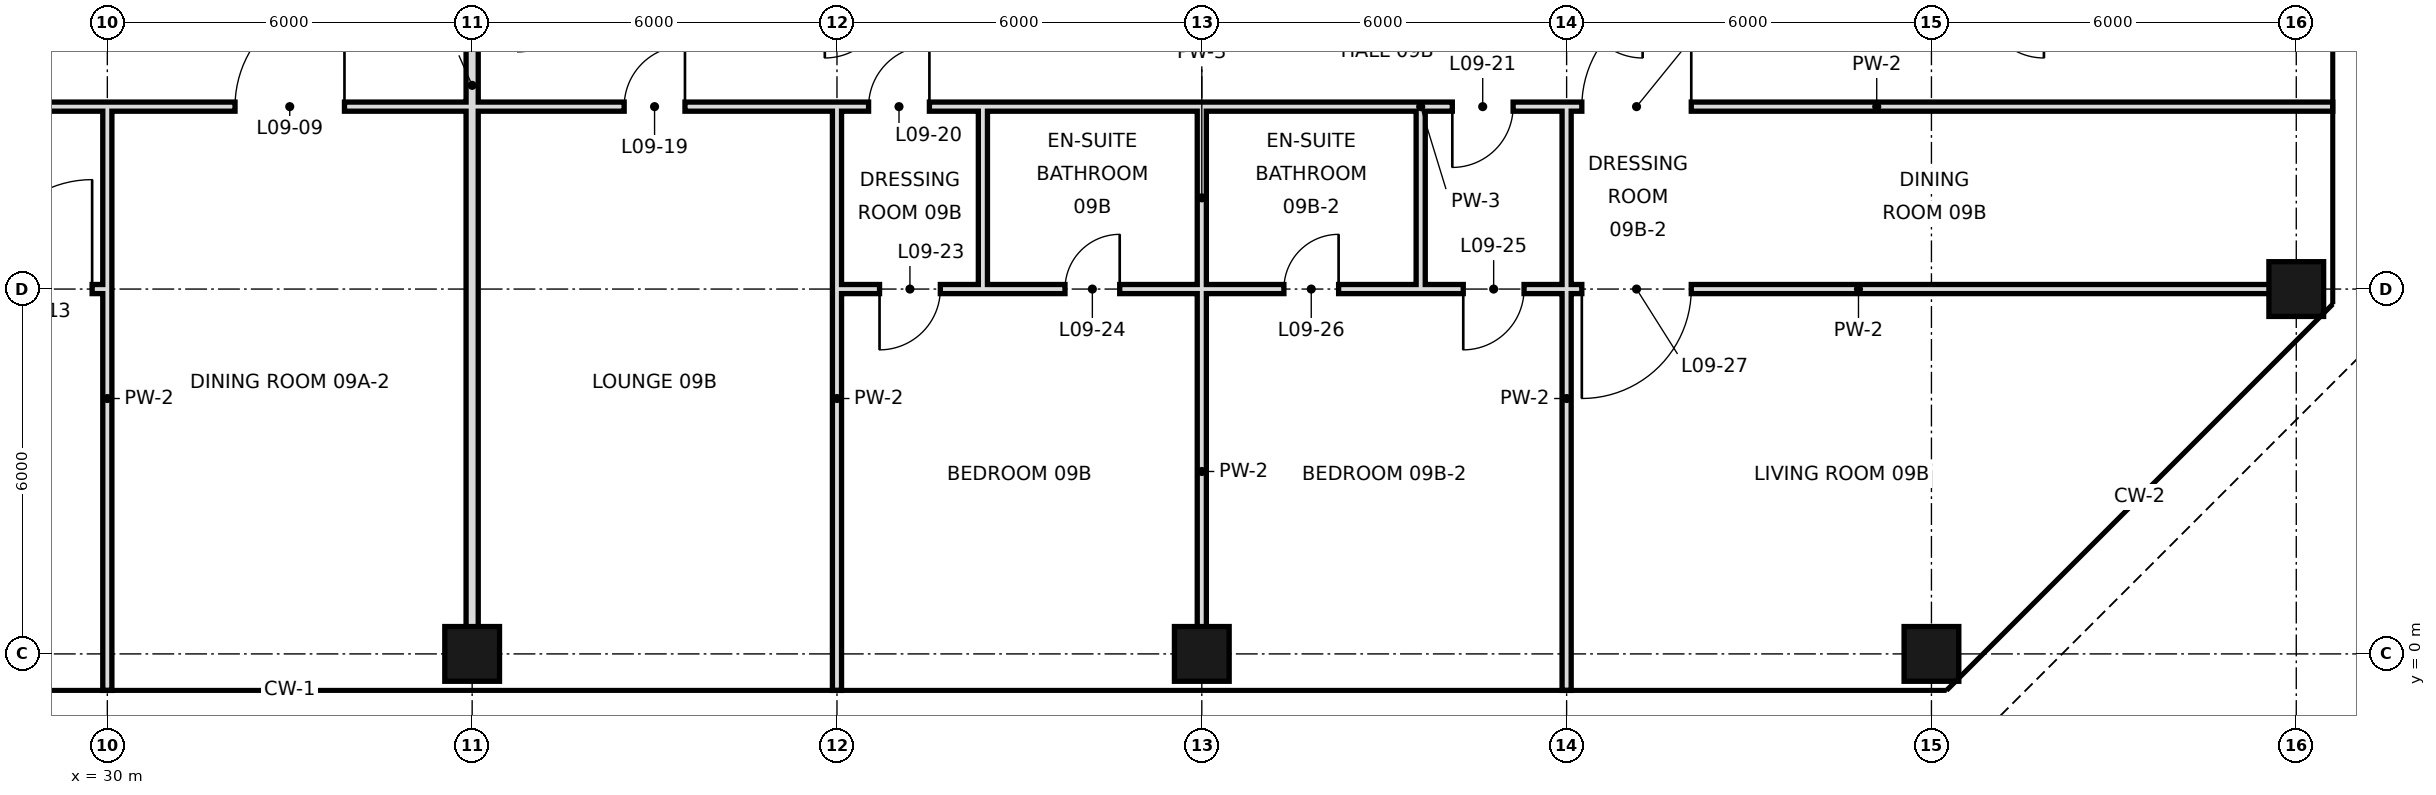
"""IFC4 building model, lengths in metres.
Left out: names, types, materials, properties, quantities, classifications, styles, units other than length and angle.
Written with IfcOpenShell. Run it as: python <this file> out.ifc"""

import sys

from ifc_helpers import new_model, si_unit, direction, frame, frame_2d, origin, origin_2d, place, context, subcontext, project, spatial, rectangle, hollow_rectangle, extrude, element, fill, save


model = new_model("IFC4")
c1 = context("Model", 3, precision=1e-05, world=origin(), true_north=direction((0.0, 1.0)))
c2 = subcontext(c1, "Body", "Model", "MODEL_VIEW")
j1 = project(units=[si_unit("LENGTHUNIT", "METRE"), si_unit("PLANEANGLEUNIT", "RADIAN")], contexts=[c1])
p1 = place(None, origin())
s1 = spatial("IfcSite", under=j1, at=p1, CompositionType="ELEMENT")
p2 = place(p1, origin())
s2 = spatial("IfcBuilding", under=s1, at=p2, CompositionType="ELEMENT")
p3 = place(p2, frame((0.0, 0.0, 53.4)))
s3 = spatial("IfcBuildingStorey", under=s2, at=p3, CompositionType="ELEMENT", Elevation=53.4)
for number, where, z_axis, x_axis in (
    (1, (36.0, 0.0, 0.0), (0.0, 0.0, 1.0), (1.0, 0.0, 0.0)),
    (2, (48.0, 0.0, 0.0), (0.0, 0.0, 1.0), (1.0, 0.0, 0.0)),
    (3, (60.0, 0.0, 0.0), (0.0, 0.0, 1.0), (1.0, 0.0, 0.0)),
    (4, (66.0, 6.0, 0.0), (0.0, 0.0, 1.0), (1.0, 0.0, 0.0)),
):
    element("IfcColumn", number, at=place(p3, frame(where, z_axis=z_axis, x_axis=x_axis)), inside=s3, PredefinedType="COLUMN", context=c2, shape_type="SweptSolid", body=[
        extrude(hollow_rectangle(XDim=0.9, YDim=0.9, WallThickness=0.045, at=origin_2d()), origin(), (0.0, 0.0, 1.0), 3.6),
    ])
p4 = place(p3, frame((30.0, -0.6, 0.0), z_axis=(0.0, 0.0, 1.0), x_axis=(0.0, 1.0, 0.0)))
e5 = element("IfcWall", 5, at=p4, inside=s3, PredefinedType="PARTITIONING", context=c2, shape_type="SweptSolid", body=[
    extrude(rectangle(XDim=9.6, YDim=0.15, at=frame_2d((4.8, 0.0))), origin(), (0.0, 0.0, 1.0), 2.72),
])
p5 = place(p3, frame((36.0, 0.0, 0.0), z_axis=(0.0, 0.0, 1.0), x_axis=(0.0, 1.0, 0.0)))
e6 = element("IfcWall", 6, at=p5, inside=s3, PredefinedType="SOLIDWALL", context=c2, shape_type="SweptSolid", body=[
    extrude(rectangle(XDim=18.7, YDim=0.2, at=frame_2d((9.35, 0.0))), origin(), (0.0, 0.0, 1.0), 2.72),
])
p6 = place(p3, frame((42.0, -0.6, 0.0), z_axis=(0.0, 0.0, 1.0), x_axis=(0.0, 1.0, 0.0)))
e7 = element("IfcWall", 7, at=p6, inside=s3, PredefinedType="PARTITIONING", context=c2, shape_type="SweptSolid", body=[
    extrude(rectangle(XDim=9.6, YDim=0.15, at=frame_2d((4.8, 0.0))), origin(), (0.0, 0.0, 1.0), 2.72),
])
p7 = place(p3, frame((44.4, 6.0, 0.0), z_axis=(0.0, 0.0, 1.0), x_axis=(0.0, 1.0, 0.0)))
e8 = element("IfcWall", 8, at=p7, inside=s3, PredefinedType="PARTITIONING", context=c2, shape_type="SweptSolid", body=[
    extrude(rectangle(XDim=3.0, YDim=0.15, at=frame_2d((1.5, 0.0))), origin(), (0.0, 0.0, 1.0), 3.42),
])
p8 = place(p3, frame((48.0, 0.0, 0.0), z_axis=(0.0, 0.0, 1.0), x_axis=(0.0, 1.0, 0.0)))
e9 = element("IfcWall", 9, at=p8, inside=s3, PredefinedType="PARTITIONING", context=c2, shape_type="SweptSolid", body=[
    extrude(rectangle(XDim=6.0, YDim=0.15, at=frame_2d((3.0, 0.0))), origin(), (0.0, 0.0, 1.0), 2.72),
])
p9 = place(p3, frame((48.0, 6.0, 0.0), z_axis=(0.0, 0.0, 1.0), x_axis=(0.0, 1.0, 0.0)))
e10 = element("IfcWall", 10, at=p9, inside=s3, PredefinedType="PARTITIONING", context=c2, shape_type="SweptSolid", body=[
    extrude(rectangle(XDim=3.0, YDim=0.15, at=frame_2d((1.5, 0.0))), origin(), (0.0, 0.0, 1.0), 2.72),
])
p10 = place(p3, frame((51.6, 6.0, 0.0), z_axis=(0.0, 0.0, 1.0), x_axis=(0.0, 1.0, 0.0)))
e11 = element("IfcWall", 11, at=p10, inside=s3, PredefinedType="PARTITIONING", context=c2, shape_type="SweptSolid", body=[
    extrude(rectangle(XDim=3.0, YDim=0.15, at=frame_2d((1.5, 0.0))), origin(), (0.0, 0.0, 1.0), 3.42),
])
p11 = place(p3, frame((54.0, -0.6, 0.0), z_axis=(0.0, 0.0, 1.0), x_axis=(0.0, 1.0, 0.0)))
e12 = element("IfcWall", 12, at=p11, inside=s3, PredefinedType="PARTITIONING", context=c2, shape_type="SweptSolid", body=[
    extrude(rectangle(XDim=9.6, YDim=0.15, at=frame_2d((4.8, 0.0))), origin(), (0.0, 0.0, 1.0), 3.42),
])
p12 = place(p3, frame((18.0, 6.0, 0.0), z_axis=(0.0, 0.0, 1.0), x_axis=(1.0, 0.0, 0.0)))
e13 = element("IfcWall", 13, at=p12, inside=s3, PredefinedType="PARTITIONING", context=c2, shape_type="SweptSolid", body=[
    extrude(rectangle(XDim=12.0, YDim=0.15, at=frame_2d((6.0, 0.0))), origin(), (0.0, 0.0, 1.0), 2.97),
])
p13 = place(p12, frame((9.95, 0.0, 0.0)))
e14 = element("IfcOpeningElement", 14, at=p13, cuts=e13, PredefinedType="OPENING", context=c2, shape_type="SweptSolid", body=[
    extrude(rectangle(XDim=1.8, YDim=2.4, at=frame_2d((0.9, 1.2))), frame((0.0, 0.085, 0.0), z_axis=(0.0, -1.0, 0.0), x_axis=(1.0, 0.0, 0.0)), (0.0, 0.0, 1.0), 0.17),
])
p14 = place(p3, frame((42.0, 6.0, 0.0), z_axis=(0.0, 0.0, 1.0), x_axis=(1.0, 0.0, 0.0)))
e15 = element("IfcWall", 15, at=p14, inside=s3, PredefinedType="PARTITIONING", context=c2, shape_type="SweptSolid", body=[
    extrude(rectangle(XDim=2.4, YDim=0.15, at=frame_2d((1.2, 0.0))), origin(), (0.0, 0.0, 1.0), 2.97),
])
p15 = place(p14, frame((0.7, 0.0, 0.0)))
e16 = element("IfcOpeningElement", 16, at=p15, cuts=e15, PredefinedType="OPENING", context=c2, shape_type="SweptSolid", body=[
    extrude(rectangle(XDim=1.0, YDim=2.4, at=frame_2d((0.5, 1.2))), frame((0.0, 0.085, 0.0), z_axis=(0.0, -1.0, 0.0), x_axis=(1.0, 0.0, 0.0)), (0.0, 0.0, 1.0), 0.17),
])
p16 = place(p3, frame((51.6, 6.0, 0.0), z_axis=(0.0, 0.0, 1.0), x_axis=(1.0, 0.0, 0.0)))
e17 = element("IfcWall", 17, at=p16, inside=s3, PredefinedType="PARTITIONING", context=c2, shape_type="SweptSolid", body=[
    extrude(rectangle(XDim=14.4, YDim=0.15, at=frame_2d((7.2, 0.0))), origin(), (0.0, 0.0, 1.0), 2.52),
])
p17 = place(p16, frame((0.7, 0.0, 0.0)))
e18 = element("IfcOpeningElement", 18, at=p17, cuts=e17, PredefinedType="OPENING", context=c2, shape_type="SweptSolid", body=[
    extrude(rectangle(XDim=1.0, YDim=2.4, at=frame_2d((0.5, 1.2))), frame((0.0, 0.085, 0.0), z_axis=(0.0, -1.0, 0.0), x_axis=(1.0, 0.0, 0.0)), (0.0, 0.0, 1.0), 0.17),
])
p18 = place(p16, frame((2.65, 0.0, 0.0)))
e19 = element("IfcOpeningElement", 19, at=p18, cuts=e17, PredefinedType="OPENING", context=c2, shape_type="SweptSolid", body=[
    extrude(rectangle(XDim=1.8, YDim=2.4, at=frame_2d((0.9, 1.2))), frame((0.0, 0.085, 0.0), z_axis=(0.0, -1.0, 0.0), x_axis=(1.0, 0.0, 0.0)), (0.0, 0.0, 1.0), 0.17),
])
p19 = place(p3, frame((44.4, 6.0, 0.0), z_axis=(0.0, 0.0, 1.0), x_axis=(1.0, 0.0, 0.0)))
e20 = element("IfcWall", 20, at=p19, inside=s3, PredefinedType="PARTITIONING", context=c2, shape_type="SweptSolid", body=[
    extrude(rectangle(XDim=7.2, YDim=0.15, at=frame_2d((3.6, 0.0))), origin(), (0.0, 0.0, 1.0), 2.52),
])
p20 = place(p19, frame((1.35, 0.0, 0.0)))
e21 = element("IfcOpeningElement", 21, at=p20, cuts=e20, PredefinedType="OPENING", context=c2, shape_type="SweptSolid", body=[
    extrude(rectangle(XDim=0.9, YDim=2.4, at=frame_2d((0.45, 1.2))), frame((0.0, 0.085, 0.0), z_axis=(0.0, -1.0, 0.0), x_axis=(1.0, 0.0, 0.0)), (0.0, 0.0, 1.0), 0.17),
])
p21 = place(p19, frame((4.95, 0.0, 0.0)))
e22 = element("IfcOpeningElement", 22, at=p21, cuts=e20, PredefinedType="OPENING", context=c2, shape_type="SweptSolid", body=[
    extrude(rectangle(XDim=0.9, YDim=2.4, at=frame_2d((0.45, 1.2))), frame((0.0, 0.085, 0.0), z_axis=(0.0, -1.0, 0.0), x_axis=(1.0, 0.0, 0.0)), (0.0, 0.0, 1.0), 0.17),
])
p22 = place(p3, frame((8.4, 9.0, 0.0), z_axis=(0.0, 0.0, 1.0), x_axis=(1.0, 0.0, 0.0)))
e23 = element("IfcWall", 23, at=p22, inside=s3, PredefinedType="PARTITIONING", context=c2, shape_type="SweptSolid", body=[
    extrude(rectangle(XDim=36.0, YDim=0.15, at=frame_2d((18.0, 0.0))), origin(), (0.0, 0.0, 1.0), 3.42),
])
p23 = place(p22, frame((0.88, 0.0, 0.0)))
e24 = element("IfcOpeningElement", 24, at=p23, cuts=e23, PredefinedType="OPENING", context=c2, shape_type="SweptSolid", body=[
    extrude(rectangle(XDim=1.0, YDim=2.4, at=frame_2d((0.5, 1.2))), frame((0.0, 0.085, 0.0), z_axis=(0.0, -1.0, 0.0), x_axis=(1.0, 0.0, 0.0)), (0.0, 0.0, 1.0), 0.17),
])
p24 = place(p22, frame((6.1, 0.0, 0.0)))
e25 = element("IfcOpeningElement", 25, at=p24, cuts=e23, PredefinedType="OPENING", context=c2, shape_type="SweptSolid", body=[
    extrude(rectangle(XDim=1.0, YDim=2.4, at=frame_2d((0.5, 1.2))), frame((0.0, 0.085, 0.0), z_axis=(0.0, -1.0, 0.0), x_axis=(1.0, 0.0, 0.0)), (0.0, 0.0, 1.0), 0.17),
])
p25 = place(p22, frame((16.64, 0.0, 0.0)))
e26 = element("IfcOpeningElement", 26, at=p25, cuts=e23, PredefinedType="OPENING", context=c2, shape_type="SweptSolid", body=[
    extrude(rectangle(XDim=1.8, YDim=2.4, at=frame_2d((0.9, 1.2))), frame((0.0, 0.085, 0.0), z_axis=(0.0, -1.0, 0.0), x_axis=(1.0, 0.0, 0.0)), (0.0, 0.0, 1.0), 0.17),
])
p26 = place(p22, frame((23.7, 0.0, 0.0)))
e27 = element("IfcOpeningElement", 27, at=p26, cuts=e23, PredefinedType="OPENING", context=c2, shape_type="SweptSolid", body=[
    extrude(rectangle(XDim=1.8, YDim=2.4, at=frame_2d((0.9, 1.2))), frame((0.0, 0.085, 0.0), z_axis=(0.0, -1.0, 0.0), x_axis=(1.0, 0.0, 0.0)), (0.0, 0.0, 1.0), 0.17),
])
p27 = place(p22, frame((30.1, 0.0, 0.0)))
e28 = element("IfcOpeningElement", 28, at=p27, cuts=e23, PredefinedType="OPENING", context=c2, shape_type="SweptSolid", body=[
    extrude(rectangle(XDim=1.0, YDim=2.4, at=frame_2d((0.5, 1.2))), frame((0.0, 0.085, 0.0), z_axis=(0.0, -1.0, 0.0), x_axis=(1.0, 0.0, 0.0)), (0.0, 0.0, 1.0), 0.17),
])
p28 = place(p22, frame((34.12, 0.0, 0.0)))
e29 = element("IfcOpeningElement", 29, at=p28, cuts=e23, PredefinedType="OPENING", context=c2, shape_type="SweptSolid", body=[
    extrude(rectangle(XDim=1.0, YDim=2.4, at=frame_2d((0.5, 1.2))), frame((0.0, 0.085, 0.0), z_axis=(0.0, -1.0, 0.0), x_axis=(1.0, 0.0, 0.0)), (0.0, 0.0, 1.0), 0.17),
])
p29 = place(p3, frame((51.6, 9.0, 0.0), z_axis=(0.0, 0.0, 1.0), x_axis=(1.0, 0.0, 0.0)))
e30 = element("IfcWall", 30, at=p29, inside=s3, PredefinedType="PARTITIONING", context=c2, shape_type="SweptSolid", body=[
    extrude(rectangle(XDim=15.0, YDim=0.15, at=frame_2d((7.5, 0.0))), origin(), (0.0, 0.0, 1.0), 3.42),
])
p30 = place(p29, frame((0.52, 0.0, 0.0)))
e31 = element("IfcOpeningElement", 31, at=p30, cuts=e30, PredefinedType="OPENING", context=c2, shape_type="SweptSolid", body=[
    extrude(rectangle(XDim=1.0, YDim=2.4, at=frame_2d((0.5, 1.2))), frame((0.0, 0.085, 0.0), z_axis=(0.0, -1.0, 0.0), x_axis=(1.0, 0.0, 0.0)), (0.0, 0.0, 1.0), 0.17),
])
p31 = place(p29, frame((2.65, 0.0, 0.0)))
e32 = element("IfcOpeningElement", 32, at=p31, cuts=e30, PredefinedType="OPENING", context=c2, shape_type="SweptSolid", body=[
    extrude(rectangle(XDim=1.8, YDim=2.4, at=frame_2d((0.9, 1.2))), frame((0.0, 0.085, 0.0), z_axis=(0.0, -1.0, 0.0), x_axis=(1.0, 0.0, 0.0)), (0.0, 0.0, 1.0), 0.17),
])
p32 = place(p3, frame((44.4, 9.0, 0.0), z_axis=(0.0, 0.0, 1.0), x_axis=(1.0, 0.0, 0.0)))
e33 = element("IfcWall", 33, at=p32, inside=s3, PredefinedType="PARTITIONING", context=c2, shape_type="SweptSolid", body=[
    extrude(rectangle(XDim=7.2, YDim=0.15, at=frame_2d((3.6, 0.0))), origin(), (0.0, 0.0, 1.0), 3.42),
])
p33 = place(p26, frame((1.8, 0.0, 0.0), z_axis=(0.0, 0.0, 1.0), x_axis=(-1.0, 0.0, 0.0)))
e34 = element("IfcDoor", 34, at=p33, inside=s3, OperationType="SINGLE_SWING_LEFT", PredefinedType="DOOR", context=c2, shape_type="SweptSolid", body=[
    extrude(rectangle(XDim=1.8, YDim=2.4, at=frame_2d((0.9, 1.2))), frame((0.0, 0.025, 0.0), z_axis=(0.0, -1.0, 0.0), x_axis=(1.0, 0.0, 0.0)), (0.0, 0.0, 1.0), 0.05),
])
fill(e27, e34)
p34 = place(p13, frame((1.8, 0.0, 0.0), z_axis=(0.0, 0.0, 1.0), x_axis=(-1.0, 0.0, 0.0)))
e35 = element("IfcDoor", 35, at=p34, inside=s3, OperationType="SINGLE_SWING_LEFT", PredefinedType="DOOR", context=c2, shape_type="SweptSolid", body=[
    extrude(rectangle(XDim=1.8, YDim=2.4, at=frame_2d((0.9, 1.2))), frame((0.0, 0.025, 0.0), z_axis=(0.0, -1.0, 0.0), x_axis=(1.0, 0.0, 0.0)), (0.0, 0.0, 1.0), 0.05),
])
fill(e14, e35)
p35 = place(p27, frame((1.0, 0.0, 0.0), z_axis=(0.0, 0.0, 1.0), x_axis=(-1.0, 0.0, 0.0)))
e36 = element("IfcDoor", 36, at=p35, inside=s3, OperationType="SINGLE_SWING_LEFT", PredefinedType="DOOR", context=c2, shape_type="SweptSolid", body=[
    extrude(rectangle(XDim=1.0, YDim=2.4, at=frame_2d((0.5, 1.2))), frame((0.0, 0.025, 0.0), z_axis=(0.0, -1.0, 0.0), x_axis=(1.0, 0.0, 0.0)), (0.0, 0.0, 1.0), 0.05),
])
fill(e28, e36)
p36 = place(p28, frame((1.0, 0.0, 0.0), z_axis=(0.0, 0.0, 1.0), x_axis=(-1.0, 0.0, 0.0)))
e37 = element("IfcDoor", 37, at=p36, inside=s3, OperationType="SINGLE_SWING_LEFT", PredefinedType="DOOR", context=c2, shape_type="SweptSolid", body=[
    extrude(rectangle(XDim=1.0, YDim=2.4, at=frame_2d((0.5, 1.2))), frame((0.0, 0.025, 0.0), z_axis=(0.0, -1.0, 0.0), x_axis=(1.0, 0.0, 0.0)), (0.0, 0.0, 1.0), 0.05),
])
fill(e29, e37)
p37 = place(p30, frame((1.0, 0.0, 0.0), z_axis=(0.0, 0.0, 1.0), x_axis=(-1.0, 0.0, 0.0)))
e38 = element("IfcDoor", 38, at=p37, inside=s3, OperationType="SINGLE_SWING_RIGHT", PredefinedType="DOOR", context=c2, shape_type="SweptSolid", body=[
    extrude(rectangle(XDim=1.0, YDim=2.4, at=frame_2d((0.5, 1.2))), frame((0.0, 0.025, 0.0), z_axis=(0.0, -1.0, 0.0), x_axis=(1.0, 0.0, 0.0)), (0.0, 0.0, 1.0), 0.05),
])
fill(e31, e38)
p38 = place(p31, frame((1.8, 0.0, 0.0), z_axis=(0.0, 0.0, 1.0), x_axis=(-1.0, 0.0, 0.0)))
e39 = element("IfcDoor", 39, at=p38, inside=s3, OperationType="SINGLE_SWING_LEFT", PredefinedType="DOOR", context=c2, shape_type="SweptSolid", body=[
    extrude(rectangle(XDim=1.8, YDim=2.4, at=frame_2d((0.9, 1.2))), frame((0.0, 0.025, 0.0), z_axis=(0.0, -1.0, 0.0), x_axis=(1.0, 0.0, 0.0)), (0.0, 0.0, 1.0), 0.05),
])
fill(e32, e39)
p39 = place(p15, frame((1.0, 0.0, 0.0), z_axis=(0.0, 0.0, 1.0), x_axis=(-1.0, 0.0, 0.0)))
e40 = element("IfcDoor", 40, at=p39, inside=s3, OperationType="SINGLE_SWING_RIGHT", PredefinedType="DOOR", context=c2, shape_type="SweptSolid", body=[
    extrude(rectangle(XDim=1.0, YDim=2.4, at=frame_2d((0.5, 1.2))), frame((0.0, 0.025, 0.0), z_axis=(0.0, -1.0, 0.0), x_axis=(1.0, 0.0, 0.0)), (0.0, 0.0, 1.0), 0.05),
])
fill(e16, e40)
p40 = place(p20, frame((0.9, 0.0, 0.0), z_axis=(0.0, 0.0, 1.0), x_axis=(-1.0, 0.0, 0.0)))
e41 = element("IfcDoor", 41, at=p40, inside=s3, OperationType="SINGLE_SWING_LEFT", PredefinedType="DOOR", context=c2, shape_type="SweptSolid", body=[
    extrude(rectangle(XDim=0.9, YDim=2.4, at=frame_2d((0.45, 1.2))), frame((0.0, 0.025, 0.0), z_axis=(0.0, -1.0, 0.0), x_axis=(1.0, 0.0, 0.0)), (0.0, 0.0, 1.0), 0.05),
])
fill(e21, e41)
p41 = place(p17, frame((1.0, 0.0, 0.0), z_axis=(0.0, 0.0, 1.0), x_axis=(-1.0, 0.0, 0.0)))
e42 = element("IfcDoor", 42, at=p41, inside=s3, OperationType="SINGLE_SWING_RIGHT", PredefinedType="DOOR", context=c2, shape_type="SweptSolid", body=[
    extrude(rectangle(XDim=1.0, YDim=2.4, at=frame_2d((0.5, 1.2))), frame((0.0, 0.025, 0.0), z_axis=(0.0, -1.0, 0.0), x_axis=(1.0, 0.0, 0.0)), (0.0, 0.0, 1.0), 0.05),
])
fill(e18, e42)
p42 = place(p21, frame((0.9, 0.0, 0.0), z_axis=(0.0, 0.0, 1.0), x_axis=(-1.0, 0.0, 0.0)))
e43 = element("IfcDoor", 43, at=p42, inside=s3, OperationType="SINGLE_SWING_LEFT", PredefinedType="DOOR", context=c2, shape_type="SweptSolid", body=[
    extrude(rectangle(XDim=0.9, YDim=2.4, at=frame_2d((0.45, 1.2))), frame((0.0, 0.025, 0.0), z_axis=(0.0, -1.0, 0.0), x_axis=(1.0, 0.0, 0.0)), (0.0, 0.0, 1.0), 0.05),
])
fill(e22, e43)
p43 = place(p18, frame((1.8, 0.0, 0.0), z_axis=(0.0, 0.0, 1.0), x_axis=(-1.0, 0.0, 0.0)))
e44 = element("IfcDoor", 44, at=p43, inside=s3, OperationType="SINGLE_SWING_RIGHT", PredefinedType="DOOR", context=c2, shape_type="SweptSolid", body=[
    extrude(rectangle(XDim=1.8, YDim=2.4, at=frame_2d((0.9, 1.2))), frame((0.0, 0.025, 0.0), z_axis=(0.0, -1.0, 0.0), x_axis=(1.0, 0.0, 0.0)), (0.0, 0.0, 1.0), 0.05),
])
fill(e19, e44)
save(model, sys.argv[1])
